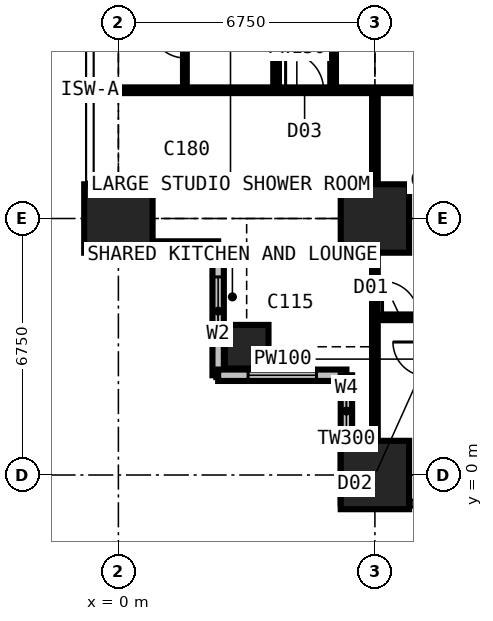
"""IFC4 building model, lengths in metres.
Left out: names, types, materials, properties, quantities, classifications, styles, units other than length and angle.
Written with IfcOpenShell. Run it as: python <this file> out.ifc"""

import sys

from ifc_helpers import new_model, si_unit, direction, frame, frame_2d, origin, origin_2d, place, context, subcontext, project, spatial, rectangle, extrude, element, fill, save


model = new_model("IFC4")
c1 = context("Model", 3, precision=1e-05, world=origin(), true_north=direction((0.0, 1.0)))
c2 = subcontext(c1, "Body", "Model", "MODEL_VIEW")
j1 = project(units=[si_unit("LENGTHUNIT", "METRE"), si_unit("PLANEANGLEUNIT", "RADIAN")], contexts=[c1])
p1 = place(None, origin())
s1 = spatial("IfcSite", under=j1, at=p1, CompositionType="ELEMENT")
p2 = place(p1, origin())
s2 = spatial("IfcBuilding", under=s1, at=p2, CompositionType="ELEMENT")
p3 = place(p2, frame((0.0, 0.0, 54.0)))
s3 = spatial("IfcBuildingStorey", under=s2, at=p3, CompositionType="ELEMENT", Elevation=54.0)
p4 = place(p3, frame((0.0, 6.75, 0.0), z_axis=(0.0, 0.0, 1.0), x_axis=(1.0, 0.0, 0.0)))
e1 = element("IfcColumn", 1, at=p4, inside=s3, PredefinedType="COLUMN", context=c2, shape_type="SweptSolid", body=[
    extrude(rectangle(XDim=1.8, YDim=1.8, at=origin_2d()), origin(), (0.0, 0.0, 1.0), 3.6),
])
p5 = place(p3, frame((3.375, 3.375, 0.0), z_axis=(0.0, 0.0, 1.0), x_axis=(1.0, 0.0, 0.0)))
e2 = element("IfcColumn", 2, at=p5, inside=s3, PredefinedType="COLUMN", context=c2, shape_type="SweptSolid", body=[
    extrude(rectangle(XDim=1.15, YDim=1.15, at=origin_2d()), origin(), (0.0, 0.0, 1.0), 3.6),
])
for number, where, z_axis, x_axis in (
    (3, (6.75, 0.0, 0.0), (0.0, 0.0, 1.0), (1.0, 0.0, 0.0)),
    (4, (6.75, 6.75, 0.0), (0.0, 0.0, 1.0), (1.0, 0.0, 0.0)),
):
    element("IfcColumn", number, at=place(p3, frame(where, z_axis=z_axis, x_axis=x_axis)), inside=s3, PredefinedType="COLUMN", context=c2, shape_type="SweptSolid", body=[
        extrude(rectangle(XDim=1.8, YDim=1.8, at=origin_2d()), origin(), (0.0, 0.0, 1.0), 3.6),
    ])
p6 = place(p3, frame((-0.75, 6.0, 0.0), z_axis=(0.0, 0.0, 1.0), x_axis=(1.0, 0.0, 0.0)))
e5 = element("IfcWall", 5, at=p6, inside=s3, PredefinedType="SOLIDWALL", context=c2, shape_type="SweptSolid", body=[
    extrude(rectangle(XDim=3.375, YDim=0.3, at=frame_2d((1.688, 0.0))), origin(), (0.0, 0.0, 1.0), 3.375),
])
p7 = place(p6, frame((1.833, 0.0, 0.9)))
e6 = element("IfcOpeningElement", 6, at=p7, cuts=e5, PredefinedType="OPENING", context=c2, shape_type="SweptSolid", body=[
    extrude(rectangle(XDim=1.2, YDim=1.8, at=frame_2d((0.6, 0.9))), frame((0.0, 0.16, 0.0), z_axis=(0.0, -1.0, 0.0), x_axis=(1.0, 0.0, 0.0)), (0.0, 0.0, 1.0), 0.32),
])
p8 = place(p3, frame((2.625, 6.0, 0.0), z_axis=(0.0, 0.0, 1.0), x_axis=(0.0, -1.0, 0.0)))
e7 = element("IfcWall", 7, at=p8, inside=s3, PredefinedType="SOLIDWALL", context=c2, shape_type="SweptSolid", body=[
    extrude(rectangle(XDim=3.375, YDim=0.3, at=frame_2d((1.688, 0.0))), origin(), (0.0, 0.0, 1.0), 3.375),
])
p9 = place(p8, frame((0.788, 0.0, 0.6)))
e8 = element("IfcOpeningElement", 8, at=p9, cuts=e7, PredefinedType="OPENING", context=c2, shape_type="SweptSolid", body=[
    extrude(rectangle(XDim=1.8, YDim=2.1, at=frame_2d((0.9, 1.05))), frame((0.0, 0.16, 0.0), z_axis=(0.0, -1.0, 0.0), x_axis=(1.0, 0.0, 0.0)), (0.0, 0.0, 1.0), 0.32),
])
p10 = place(p3, frame((2.625, 2.625, 0.0), z_axis=(0.0, 0.0, 1.0), x_axis=(1.0, 0.0, 0.0)))
e9 = element("IfcWall", 9, at=p10, inside=s3, PredefinedType="SOLIDWALL", context=c2, shape_type="SweptSolid", body=[
    extrude(rectangle(XDim=3.375, YDim=0.3, at=frame_2d((1.688, 0.0))), origin(), (0.0, 0.0, 1.0), 3.375),
])
p11 = place(p10, frame((0.788, 0.0, 0.6)))
e10 = element("IfcOpeningElement", 10, at=p11, cuts=e9, PredefinedType="OPENING", context=c2, shape_type="SweptSolid", body=[
    extrude(rectangle(XDim=1.8, YDim=2.1, at=frame_2d((0.9, 1.05))), frame((0.0, 0.16, 0.0), z_axis=(0.0, -1.0, 0.0), x_axis=(1.0, 0.0, 0.0)), (0.0, 0.0, 1.0), 0.32),
])
p12 = place(p3, frame((6.0, 2.625, 0.0), z_axis=(0.0, 0.0, 1.0), x_axis=(0.0, -1.0, 0.0)))
e11 = element("IfcWall", 11, at=p12, inside=s3, PredefinedType="SOLIDWALL", context=c2, shape_type="SweptSolid", body=[
    extrude(rectangle(XDim=3.375, YDim=0.3, at=frame_2d((1.688, 0.0))), origin(), (0.0, 0.0, 1.0), 3.375),
])
p13 = place(p12, frame((0.343, 0.0, 0.9)))
e12 = element("IfcOpeningElement", 12, at=p13, cuts=e11, PredefinedType="OPENING", context=c2, shape_type="SweptSolid", body=[
    extrude(rectangle(XDim=1.2, YDim=1.8, at=frame_2d((0.6, 0.9))), frame((0.0, 0.16, 0.0), z_axis=(0.0, -1.0, 0.0), x_axis=(1.0, 0.0, 0.0)), (0.0, 0.0, 1.0), 0.32),
])
p14 = place(p3, frame((-0.734, 10.125, 0.0), z_axis=(0.0, 0.0, 1.0), x_axis=(1.0, 0.0, 0.0)))
e13 = element("IfcWall", 13, at=p14, inside=s3, PredefinedType="PARTITIONING", context=c2, shape_type="SweptSolid", body=[
    extrude(rectangle(XDim=10.859, YDim=0.15, at=frame_2d((5.429, 0.0))), origin(), (0.0, 0.0, 1.0), 3.375),
])
p15 = place(p14, frame((5.134, 0.0, 0.0)))
e14 = element("IfcOpeningElement", 14, at=p15, cuts=e13, PredefinedType="OPENING", context=c2, shape_type="SweptSolid", body=[
    extrude(rectangle(XDim=1.0, YDim=2.2, at=frame_2d((0.5, 1.1))), frame((0.0, 0.085, 0.0), z_axis=(0.0, -1.0, 0.0), x_axis=(1.0, 0.0, 0.0)), (0.0, 0.0, 1.0), 0.17),
])
p16 = place(p3, frame((1.75, 10.125, 0.0), z_axis=(0.0, 0.0, 1.0), x_axis=(0.0, 1.0, 0.0)))
e15 = element("IfcWall", 15, at=p16, inside=s3, PredefinedType="PARTITIONING", context=c2, shape_type="SweptSolid", body=[
    extrude(rectangle(XDim=2.6, YDim=0.1, at=frame_2d((1.3, 0.0))), origin(), (0.0, 0.0, 1.0), 3.375),
])
p17 = place(p16, frame((0.85, 0.0, 0.0)))
e16 = element("IfcOpeningElement", 16, at=p17, cuts=e15, PredefinedType="OPENING", context=c2, shape_type="SweptSolid", body=[
    extrude(rectangle(XDim=0.9, YDim=2.2, at=frame_2d((0.45, 1.1))), frame((0.0, 0.06, 0.0), z_axis=(0.0, -1.0, 0.0), x_axis=(1.0, 0.0, 0.0)), (0.0, 0.0, 1.0), 0.12),
])
p18 = place(p3, frame((4.15, 10.125, 0.0), z_axis=(0.0, 0.0, 1.0), x_axis=(0.0, 1.0, 0.0)))
e17 = element("IfcWall", 17, at=p18, inside=s3, PredefinedType="PARTITIONING", context=c2, shape_type="SweptSolid", body=[
    extrude(rectangle(XDim=23.625, YDim=0.15, at=frame_2d((11.812, 0.0))), origin(), (0.0, 0.0, 1.0), 3.375),
])
p19 = place(p18, frame((4.2, 0.0, 0.0)))
e18 = element("IfcOpeningElement", 18, at=p19, cuts=e17, PredefinedType="OPENING", context=c2, shape_type="SweptSolid", body=[
    extrude(rectangle(XDim=0.95, YDim=2.2, at=frame_2d((0.475, 1.1))), frame((0.0, 0.085, 0.0), z_axis=(0.0, -1.0, 0.0), x_axis=(1.0, 0.0, 0.0)), (0.0, 0.0, 1.0), 0.17),
])
p20 = place(p18, frame((10.95, 0.0, 0.0)))
e19 = element("IfcOpeningElement", 19, at=p20, cuts=e17, PredefinedType="OPENING", context=c2, shape_type="SweptSolid", body=[
    extrude(rectangle(XDim=0.95, YDim=2.2, at=frame_2d((0.475, 1.1))), frame((0.0, 0.085, 0.0), z_axis=(0.0, -1.0, 0.0), x_axis=(1.0, 0.0, 0.0)), (0.0, 0.0, 1.0), 0.17),
])
p21 = place(p18, frame((17.7, 0.0, 0.0)))
e20 = element("IfcOpeningElement", 20, at=p21, cuts=e17, PredefinedType="OPENING", context=c2, shape_type="SweptSolid", body=[
    extrude(rectangle(XDim=0.95, YDim=2.2, at=frame_2d((0.475, 1.1))), frame((0.0, 0.085, 0.0), z_axis=(0.0, -1.0, 0.0), x_axis=(1.0, 0.0, 0.0)), (0.0, 0.0, 1.0), 0.17),
])
p22 = place(p3, frame((5.65, 10.125, 0.0), z_axis=(0.0, 0.0, 1.0), x_axis=(0.0, 1.0, 0.0)))
e21 = element("IfcWall", 21, at=p22, inside=s3, PredefinedType="PARTITIONING", context=c2, shape_type="SweptSolid", body=[
    extrude(rectangle(XDim=10.762, YDim=0.15, at=frame_2d((5.381, 0.0))), origin(), (0.0, 0.0, 1.0), 3.375),
])
p23 = place(p22, frame((4.9, 0.0, 0.0)))
e22 = element("IfcOpeningElement", 22, at=p23, cuts=e21, PredefinedType="OPENING", context=c2, shape_type="SweptSolid", body=[
    extrude(rectangle(XDim=0.95, YDim=2.2, at=frame_2d((0.475, 1.1))), frame((0.0, 0.085, 0.0), z_axis=(0.0, -1.0, 0.0), x_axis=(1.0, 0.0, 0.0)), (0.0, 0.0, 1.0), 0.17),
])
p24 = place(p3, frame((6.75, -0.734, 0.0), z_axis=(0.0, 0.0, 1.0), x_axis=(0.0, 1.0, 0.0)))
e23 = element("IfcWall", 23, at=p24, inside=s3, PredefinedType="PARTITIONING", context=c2, shape_type="SweptSolid", body=[
    extrude(rectangle(XDim=10.859, YDim=0.15, at=frame_2d((5.429, 0.0))), origin(), (0.0, 0.0, 1.0), 2.877),
])
p25 = place(p3, frame((6.75, 4.15, 0.0), z_axis=(0.0, 0.0, 1.0), x_axis=(1.0, 0.0, 0.0)))
e24 = element("IfcWall", 24, at=p25, inside=s3, PredefinedType="PARTITIONING", context=c2, shape_type="SweptSolid", body=[
    extrude(rectangle(XDim=23.625, YDim=0.15, at=frame_2d((11.812, 0.0))), origin(), (0.0, 0.0, 1.0), 3.375),
])
p26 = place(p25, frame((0.2, 0.0, 0.0)))
e25 = element("IfcOpeningElement", 25, at=p26, cuts=e24, PredefinedType="OPENING", context=c2, shape_type="SweptSolid", body=[
    extrude(rectangle(XDim=0.95, YDim=2.2, at=frame_2d((0.475, 1.1))), frame((0.0, 0.085, 0.0), z_axis=(0.0, -1.0, 0.0), x_axis=(1.0, 0.0, 0.0)), (0.0, 0.0, 1.0), 0.17),
])
p27 = place(p25, frame((3.625, 0.0, 0.0)))
e26 = element("IfcOpeningElement", 26, at=p27, cuts=e24, PredefinedType="OPENING", context=c2, shape_type="SweptSolid", body=[
    extrude(rectangle(XDim=0.95, YDim=2.2, at=frame_2d((0.475, 1.1))), frame((0.0, 0.085, 0.0), z_axis=(0.0, -1.0, 0.0), x_axis=(1.0, 0.0, 0.0)), (0.0, 0.0, 1.0), 0.17),
])
p28 = place(p25, frame((18.475, 0.0, 0.0)))
e27 = element("IfcOpeningElement", 27, at=p28, cuts=e24, PredefinedType="OPENING", context=c2, shape_type="SweptSolid", body=[
    extrude(rectangle(XDim=0.95, YDim=2.2, at=frame_2d((0.475, 1.1))), frame((0.0, 0.085, 0.0), z_axis=(0.0, -1.0, 0.0), x_axis=(1.0, 0.0, 0.0)), (0.0, 0.0, 1.0), 0.17),
])
p29 = place(p25, frame((11.725, 0.0, 0.0)))
e28 = element("IfcOpeningElement", 28, at=p29, cuts=e24, PredefinedType="OPENING", context=c2, shape_type="SweptSolid", body=[
    extrude(rectangle(XDim=0.95, YDim=2.2, at=frame_2d((0.475, 1.1))), frame((0.0, 0.085, 0.0), z_axis=(0.0, -1.0, 0.0), x_axis=(1.0, 0.0, 0.0)), (0.0, 0.0, 1.0), 0.17),
])
p30 = place(p25, frame((6.95, 0.0, 0.0)))
e29 = element("IfcOpeningElement", 29, at=p30, cuts=e24, PredefinedType="OPENING", context=c2, shape_type="SweptSolid", body=[
    extrude(rectangle(XDim=0.95, YDim=2.2, at=frame_2d((0.475, 1.1))), frame((0.0, 0.085, 0.0), z_axis=(0.0, -1.0, 0.0), x_axis=(1.0, 0.0, 0.0)), (0.0, 0.0, 1.0), 0.17),
])
p31 = place(p7, origin())
e30 = element("IfcWindow", 30, at=p31, inside=s3, PartitioningType="SINGLE_PANEL", PredefinedType="WINDOW", context=c2, shape_type="SweptSolid", body=[
    extrude(rectangle(XDim=1.2, YDim=1.8, at=frame_2d((0.6, 0.9))), frame((0.0, 0.03, 0.0), z_axis=(0.0, -1.0, 0.0), x_axis=(1.0, 0.0, 0.0)), (0.0, 0.0, 1.0), 0.06),
])
fill(e6, e30)
p32 = place(p9, origin())
e31 = element("IfcWindow", 31, at=p32, inside=s3, PartitioningType="SINGLE_PANEL", PredefinedType="WINDOW", context=c2, shape_type="SweptSolid", body=[
    extrude(rectangle(XDim=1.8, YDim=2.1, at=frame_2d((0.9, 1.05))), frame((0.0, 0.03, 0.0), z_axis=(0.0, -1.0, 0.0), x_axis=(1.0, 0.0, 0.0)), (0.0, 0.0, 1.0), 0.06),
])
fill(e8, e31)
p33 = place(p11, origin())
e32 = element("IfcWindow", 32, at=p33, inside=s3, PartitioningType="SINGLE_PANEL", PredefinedType="WINDOW", context=c2, shape_type="SweptSolid", body=[
    extrude(rectangle(XDim=1.8, YDim=2.1, at=frame_2d((0.9, 1.05))), frame((0.0, 0.03, 0.0), z_axis=(0.0, -1.0, 0.0), x_axis=(1.0, 0.0, 0.0)), (0.0, 0.0, 1.0), 0.06),
])
fill(e10, e32)
p34 = place(p13, origin())
e33 = element("IfcWindow", 33, at=p34, inside=s3, PartitioningType="SINGLE_PANEL", PredefinedType="WINDOW", context=c2, shape_type="SweptSolid", body=[
    extrude(rectangle(XDim=1.2, YDim=1.8, at=frame_2d((0.6, 0.9))), frame((0.0, 0.03, 0.0), z_axis=(0.0, -1.0, 0.0), x_axis=(1.0, 0.0, 0.0)), (0.0, 0.0, 1.0), 0.06),
])
fill(e12, e33)
p35 = place(p15, origin())
e34 = element("IfcDoor", 34, at=p35, inside=s3, OperationType="SINGLE_SWING_LEFT", PredefinedType="DOOR", context=c2, shape_type="SweptSolid", body=[
    extrude(rectangle(XDim=1.0, YDim=2.2, at=frame_2d((0.5, 1.1))), frame((0.0, 0.025, 0.0), z_axis=(0.0, -1.0, 0.0), x_axis=(1.0, 0.0, 0.0)), (0.0, 0.0, 1.0), 0.05),
])
fill(e14, e34)
p36 = place(p26, origin())
e35 = element("IfcDoor", 35, at=p36, inside=s3, OperationType="SINGLE_SWING_LEFT", PredefinedType="DOOR", context=c2, shape_type="SweptSolid", body=[
    extrude(rectangle(XDim=0.95, YDim=2.2, at=frame_2d((0.475, 1.1))), frame((0.0, 0.025, 0.0), z_axis=(0.0, -1.0, 0.0), x_axis=(1.0, 0.0, 0.0)), (0.0, 0.0, 1.0), 0.05),
])
fill(e25, e35)
p37 = place(p17, origin())
e36 = element("IfcDoor", 36, at=p37, inside=s3, OperationType="SINGLE_SWING_RIGHT", PredefinedType="DOOR", context=c2, shape_type="SweptSolid", body=[
    extrude(rectangle(XDim=0.9, YDim=2.2, at=frame_2d((0.45, 1.1))), frame((0.0, 0.025, 0.0), z_axis=(0.0, -1.0, 0.0), x_axis=(1.0, 0.0, 0.0)), (0.0, 0.0, 1.0), 0.05),
])
fill(e16, e36)
save(model, sys.argv[1])
